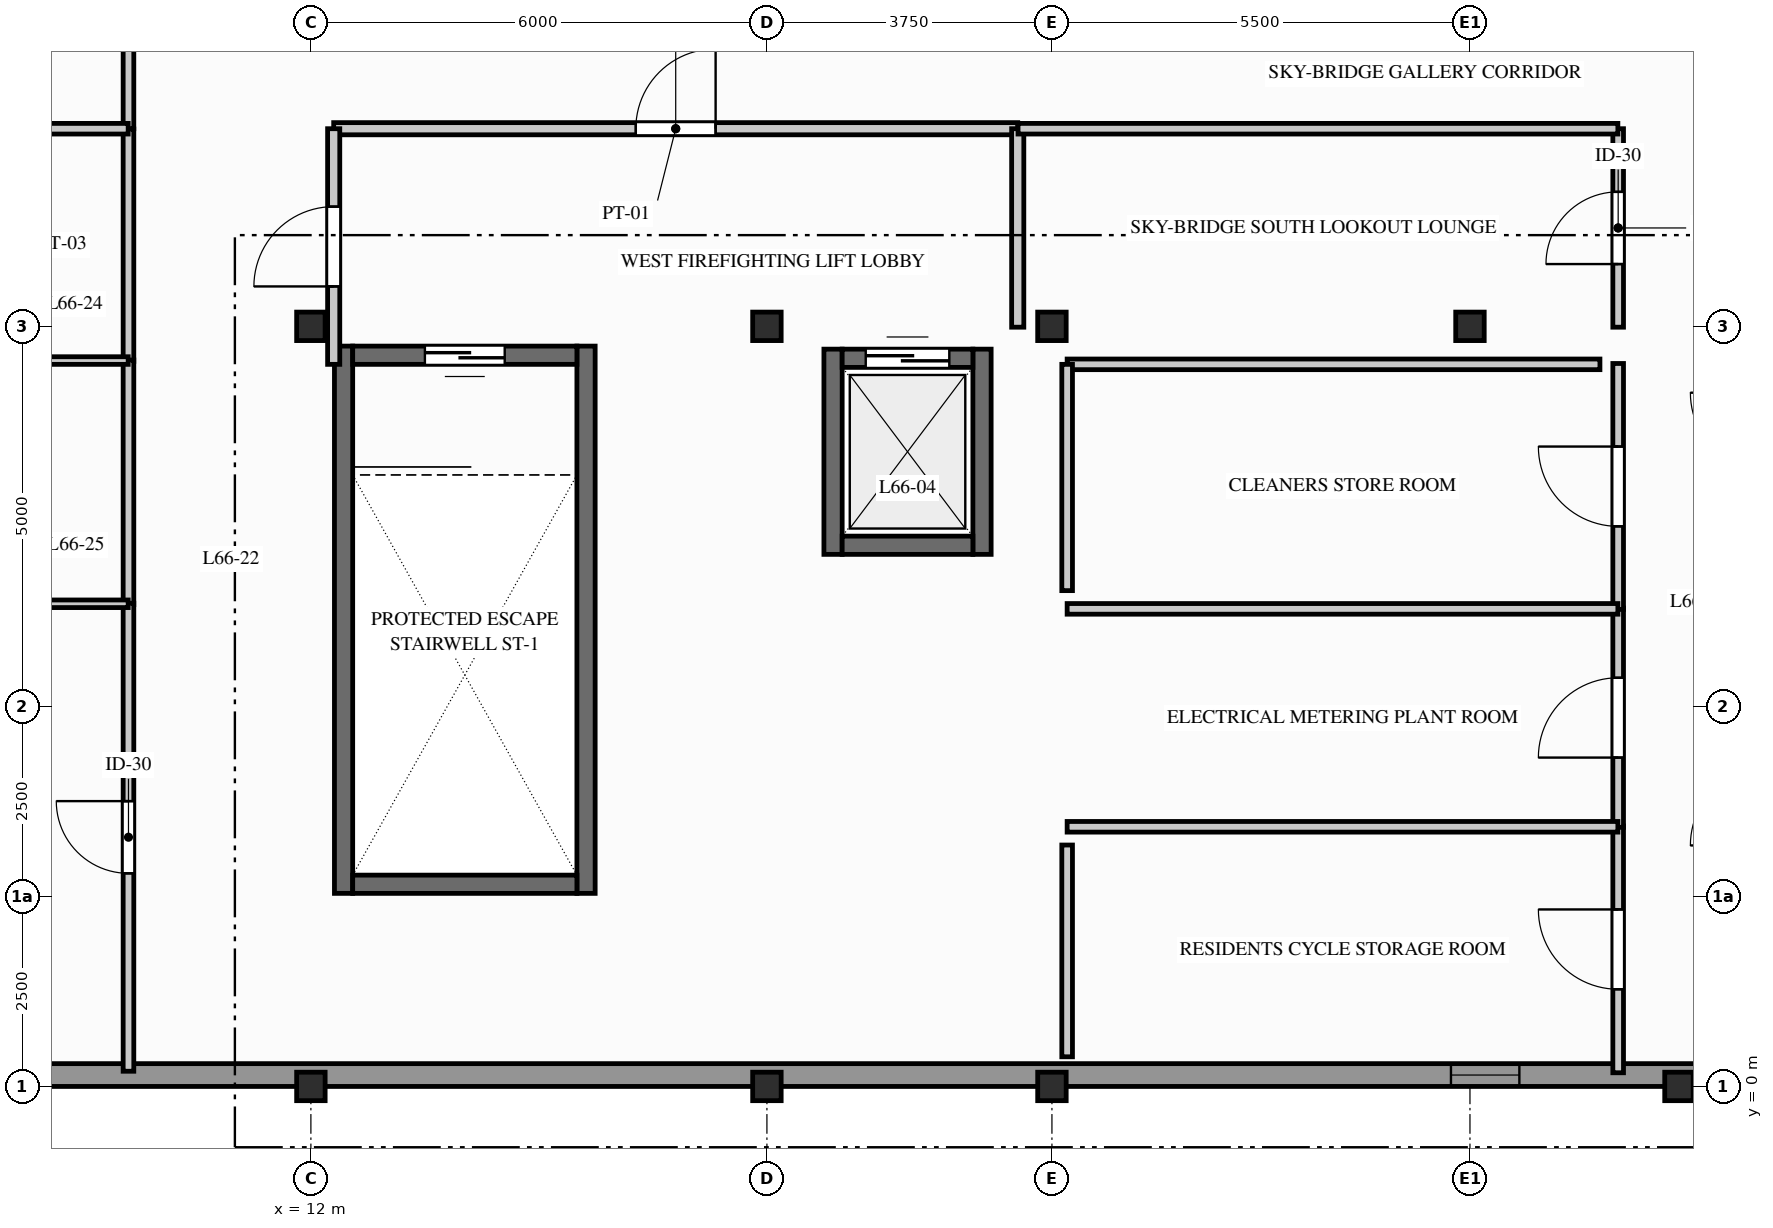
"""IFC4 building model, lengths in metres.
Left out: names, types, materials, properties, quantities, classifications, styles, units other than length and angle.
Written with IfcOpenShell. Run it as: python <this file> out.ifc"""

import sys

from ifc_helpers import new_model, si_unit, direction, frame, frame_2d, origin, origin_2d, place, context, subcontext, project, spatial, rectangle, i_section, extrude, element, fill, save


model = new_model("IFC4")
c1 = context("Model", 3, precision=1e-05, world=origin(), true_north=direction((0.0, 1.0)))
c2 = subcontext(c1, "Body", "Model", "MODEL_VIEW")
j1 = project(units=[si_unit("LENGTHUNIT", "METRE"), si_unit("PLANEANGLEUNIT", "RADIAN")], contexts=[c1])
p1 = place(None, origin())
s1 = spatial("IfcSite", under=j1, at=p1, CompositionType="ELEMENT")
p2 = place(p1, origin())
s2 = spatial("IfcBuilding", under=s1, at=p2, CompositionType="ELEMENT")
p3 = place(p2, frame((0.0, 0.0, 218.0)))
s3 = spatial("IfcBuildingStorey", under=s2, at=p3, CompositionType="ELEMENT", Elevation=218.0)
for number, where, z_axis, x_axis in (
    (1, (12.0, 0.0, 0.0), (0.0, 0.0, 1.0), (1.0, 0.0, 0.0)),
    (2, (12.0, 10.0, 0.0), (0.0, 0.0, 1.0), (1.0, 0.0, 0.0)),
    (3, (18.0, 0.0, 0.0), (0.0, 0.0, 1.0), (1.0, 0.0, 0.0)),
    (4, (18.0, 10.0, 0.0), (0.0, 0.0, 1.0), (1.0, 0.0, 0.0)),
    (5, (21.75, 0.0, 0.0), (0.0, 0.0, 1.0), (1.0, 0.0, 0.0)),
    (6, (21.75, 10.0, 0.0), (0.0, 0.0, 1.0), (1.0, 0.0, 0.0)),
    (7, (27.25, 10.0, 0.0), (0.0, 0.0, 1.0), (1.0, 0.0, 0.0)),
    (8, (30.0, 0.0, 0.0), (0.0, 0.0, 1.0), (1.0, 0.0, 0.0)),
):
    element("IfcColumn", number, at=place(p3, frame(where, z_axis=z_axis, x_axis=x_axis)), inside=s3, PredefinedType="COLUMN", context=c2, shape_type="SweptSolid", body=[
        extrude(i_section(OverallWidth=0.375, OverallDepth=0.375, WebThickness=0.017, FlangeThickness=0.027, FilletRadius=0.015, at=origin_2d()), origin(), (0.0, 0.0, 1.0), 3.1),
    ])
p4 = place(p3, frame((2.5, 0.15, 0.0), z_axis=(0.0, 0.0, 1.0), x_axis=(1.0, 0.0, 0.0)))
e9 = element("IfcWall", 9, at=p4, inside=s3, PredefinedType="STANDARD", context=c2, shape_type="SweptSolid", body=[
    extrude(rectangle(XDim=55.0, YDim=0.3, at=frame_2d((27.5, 0.0))), origin(), (0.0, 0.0, 1.0), 2.332),
])
p5 = place(p4, frame((1.0, 0.0, 0.312)))
e10 = element("IfcOpeningElement", 10, at=p5, cuts=e9, PredefinedType="OPENING", context=c2, shape_type="SweptSolid", body=[
    extrude(rectangle(XDim=1.5, YDim=1.8, at=frame_2d((0.75, 0.9))), frame((0.0, 0.16, 0.0), z_axis=(0.0, -1.0, 0.0), x_axis=(1.0, 0.0, 0.0)), (0.0, 0.0, 1.0), 0.32),
])
p6 = place(p4, frame((24.5, 0.0, 1.15)))
e11 = element("IfcOpeningElement", 11, at=p6, cuts=e9, PredefinedType="OPENING", context=c2, shape_type="SweptSolid", body=[
    extrude(rectangle(XDim=0.9, YDim=0.9, at=frame_2d((0.45, 0.45))), frame((0.0, 0.16, 0.0), z_axis=(0.0, -1.0, 0.0), x_axis=(1.0, 0.0, 0.0)), (0.0, 0.0, 1.0), 0.32),
])
p7 = place(p4, frame((47.2, 0.0, 0.512)))
e12 = element("IfcOpeningElement", 12, at=p7, cuts=e9, PredefinedType="OPENING", context=c2, shape_type="SweptSolid", body=[
    extrude(rectangle(XDim=1.2, YDim=1.6, at=frame_2d((0.6, 0.8))), frame((0.0, 0.16, 0.0), z_axis=(0.0, -1.0, 0.0), x_axis=(1.0, 0.0, 0.0)), (0.0, 0.0, 1.0), 0.32),
])
p8 = place(p4, frame((52.3, 0.0, 0.512)))
e13 = element("IfcOpeningElement", 13, at=p8, cuts=e9, PredefinedType="OPENING", context=c2, shape_type="SweptSolid", body=[
    extrude(rectangle(XDim=1.2, YDim=1.6, at=frame_2d((0.6, 0.8))), frame((0.0, 0.16, 0.0), z_axis=(0.0, -1.0, 0.0), x_axis=(1.0, 0.0, 0.0)), (0.0, 0.0, 1.0), 0.32),
])
for number, where, z_axis, x_axis in (
    (14, (12.43, 2.54, 0.0), (0.0, 0.0, 1.0), (0.0, 1.0, 0.0)),
    (15, (15.62, 2.54, 0.0), (0.0, 0.0, 1.0), (0.0, 1.0, 0.0)),
):
    element("IfcWall", number, at=place(p3, frame(where, z_axis=z_axis, x_axis=x_axis)), inside=s3, PredefinedType="SHEAR", context=c2, shape_type="SweptSolid", body=[
        extrude(rectangle(XDim=7.2, YDim=0.24, at=frame_2d((3.6, 0.0))), origin(), (0.0, 0.0, 1.0), 2.89),
    ])
p9 = place(p3, frame((12.55, 2.66, 0.0), z_axis=(0.0, 0.0, 1.0), x_axis=(1.0, 0.0, 0.0)))
e16 = element("IfcWall", 16, at=p9, inside=s3, PredefinedType="SHEAR", context=c2, shape_type="SweptSolid", body=[
    extrude(rectangle(XDim=2.95, YDim=0.24, at=frame_2d((1.475, 0.0))), origin(), (0.0, 0.0, 1.0), 2.89),
])
p10 = place(p3, frame((15.5, 9.62, 0.0), z_axis=(0.0, 0.0, 1.0), x_axis=(-1.0, 0.0, 0.0)))
e17 = element("IfcWall", 17, at=p10, inside=s3, PredefinedType="SHEAR", context=c2, shape_type="SweptSolid", body=[
    extrude(rectangle(XDim=2.95, YDim=0.24, at=frame_2d((1.475, 0.0))), origin(), (0.0, 0.0, 1.0), 2.89),
])
p11 = place(p10, frame((0.95, 0.0, 0.0)))
e18 = element("IfcOpeningElement", 18, at=p11, cuts=e17, PredefinedType="OPENING", context=c2, shape_type="SweptSolid", body=[
    extrude(rectangle(XDim=1.05, YDim=2.06, at=frame_2d((0.525, 1.03))), frame((0.0, 0.13, 0.0), z_axis=(0.0, -1.0, 0.0), x_axis=(1.0, 0.0, 0.0)), (0.0, 0.0, 1.0), 0.26),
])
for number, where, z_axis, x_axis in (
    (19, (18.87, 7.0, 0.0), (0.0, 0.0, 1.0), (0.0, 1.0, 0.0)),
    (20, (20.83, 7.0, 0.0), (0.0, 0.0, 1.0), (0.0, 1.0, 0.0)),
):
    element("IfcWall", number, at=place(p3, frame(where, z_axis=z_axis, x_axis=x_axis)), inside=s3, PredefinedType="SHEAR", context=c2, shape_type="SweptSolid", body=[
        extrude(rectangle(XDim=2.7, YDim=0.24, at=frame_2d((1.35, 0.0))), origin(), (0.0, 0.0, 1.0), 2.89),
    ])
p12 = place(p3, frame((18.99, 7.12, 0.0), z_axis=(0.0, 0.0, 1.0), x_axis=(1.0, 0.0, 0.0)))
e21 = element("IfcWall", 21, at=p12, inside=s3, PredefinedType="SHEAR", context=c2, shape_type="SweptSolid", body=[
    extrude(rectangle(XDim=1.72, YDim=0.24, at=frame_2d((0.86, 0.0))), origin(), (0.0, 0.0, 1.0), 2.89),
])
p13 = place(p3, frame((18.99, 9.58, 0.0), z_axis=(0.0, 0.0, 1.0), x_axis=(1.0, 0.0, 0.0)))
e22 = element("IfcWall", 22, at=p13, inside=s3, PredefinedType="SHEAR", context=c2, shape_type="SweptSolid", body=[
    extrude(rectangle(XDim=1.72, YDim=0.24, at=frame_2d((0.86, 0.0))), origin(), (0.0, 0.0, 1.0), 2.89),
])
p14 = place(p13, frame((0.31, 0.0, 0.0)))
e23 = element("IfcOpeningElement", 23, at=p14, cuts=e22, PredefinedType="OPENING", context=c2, shape_type="SweptSolid", body=[
    extrude(rectangle(XDim=1.1, YDim=2.06, at=frame_2d((0.55, 1.03))), frame((0.0, 0.13, 0.0), z_axis=(0.0, -1.0, 0.0), x_axis=(1.0, 0.0, 0.0)), (0.0, 0.0, 1.0), 0.26),
])
p15 = place(p3, frame((29.2, 0.18, 0.0), z_axis=(0.0, 0.0, 1.0), x_axis=(0.0, 1.0, 0.0)))
e24 = element("IfcWall", 24, at=p15, inside=s3, PredefinedType="PARTITIONING", context=c2, shape_type="SweptSolid", body=[
    extrude(rectangle(XDim=3.247, YDim=0.14, at=frame_2d((1.624, 0.0))), origin(), (0.0, 0.0, 1.0), 2.89),
])
p16 = place(p15, frame((1.099, 0.0, 0.0)))
e25 = element("IfcOpeningElement", 25, at=p16, cuts=e24, PredefinedType="OPENING", context=c2, shape_type="SweptSolid", body=[
    extrude(rectangle(XDim=1.05, YDim=2.06, at=frame_2d((0.525, 1.03))), frame((0.0, 0.08, 0.0), z_axis=(0.0, -1.0, 0.0), x_axis=(1.0, 0.0, 0.0)), (0.0, 0.0, 1.0), 0.16),
])
p17 = place(p3, frame((29.2, 3.409, 0.0), z_axis=(0.0, 0.0, 1.0), x_axis=(0.0, 1.0, 0.0)))
e26 = element("IfcWall", 26, at=p17, inside=s3, PredefinedType="PARTITIONING", context=c2, shape_type="SweptSolid", body=[
    extrude(rectangle(XDim=2.885, YDim=0.14, at=frame_2d((1.443, 0.0))), origin(), (0.0, 0.0, 1.0), 2.89),
])
p18 = place(p17, frame((0.918, 0.0, 0.0)))
e27 = element("IfcOpeningElement", 27, at=p18, cuts=e26, PredefinedType="OPENING", context=c2, shape_type="SweptSolid", body=[
    extrude(rectangle(XDim=1.05, YDim=2.06, at=frame_2d((0.525, 1.03))), frame((0.0, 0.08, 0.0), z_axis=(0.0, -1.0, 0.0), x_axis=(1.0, 0.0, 0.0)), (0.0, 0.0, 1.0), 0.16),
])
p19 = place(p3, frame((29.2, 6.276, 0.0), z_axis=(0.0, 0.0, 1.0), x_axis=(0.0, 1.0, 0.0)))
e28 = element("IfcWall", 28, at=p19, inside=s3, PredefinedType="PARTITIONING", context=c2, shape_type="SweptSolid", body=[
    extrude(rectangle(XDim=3.236, YDim=0.14, at=frame_2d((1.618, 0.0))), origin(), (0.0, 0.0, 1.0), 2.89),
])
p20 = place(p19, frame((1.093, 0.0, 0.0)))
e29 = element("IfcOpeningElement", 29, at=p20, cuts=e28, PredefinedType="OPENING", context=c2, shape_type="SweptSolid", body=[
    extrude(rectangle(XDim=1.05, YDim=2.06, at=frame_2d((0.525, 1.03))), frame((0.0, 0.08, 0.0), z_axis=(0.0, -1.0, 0.0), x_axis=(1.0, 0.0, 0.0)), (0.0, 0.0, 1.0), 0.16),
])
p21 = place(p3, frame((29.2, 9.989, 0.0), z_axis=(0.0, 0.0, 1.0), x_axis=(0.0, 1.0, 0.0)))
e30 = element("IfcWall", 30, at=p21, inside=s3, PredefinedType="PARTITIONING", context=c2, shape_type="SweptSolid", body=[
    extrude(rectangle(XDim=2.611, YDim=0.14, at=frame_2d((1.306, 0.0))), origin(), (0.0, 0.0, 1.0), 2.325),
])
p22 = place(p21, frame((0.831, 0.0, 0.0)))
e31 = element("IfcOpeningElement", 31, at=p22, cuts=e30, PredefinedType="OPENING", context=c2, shape_type="SweptSolid", body=[
    extrude(rectangle(XDim=0.95, YDim=2.05, at=frame_2d((0.475, 1.025))), frame((0.0, 0.08, 0.0), z_axis=(0.0, -1.0, 0.0), x_axis=(1.0, 0.0, 0.0)), (0.0, 0.0, 1.0), 0.16),
])
for number, where, z_axis, x_axis in (
    (32, (21.95, 3.416, 0.0), (0.0, 0.0, 1.0), (1.0, 0.0, 0.0)),
    (33, (21.95, 6.283, 0.0), (0.0, 0.0, 1.0), (1.0, 0.0, 0.0)),
):
    element("IfcWall", number, at=place(p3, frame(where, z_axis=z_axis, x_axis=x_axis)), inside=s3, PredefinedType="PARTITIONING", context=c2, shape_type="SweptSolid", body=[
        extrude(rectangle(XDim=7.246, YDim=0.14, at=frame_2d((3.623, 0.0))), origin(), (0.0, 0.0, 1.0), 2.89),
    ])
p23 = place(p3, frame((12.3, 12.6, 0.0), z_axis=(0.0, 0.0, 1.0), x_axis=(1.0, 0.0, 0.0)))
e34 = element("IfcWall", 34, at=p23, inside=s3, PredefinedType="PARTITIONING", context=c2, shape_type="SweptSolid", body=[
    extrude(rectangle(XDim=9.0, YDim=0.16, at=frame_2d((4.5, 0.0))), origin(), (0.0, 0.0, 1.0), 2.325),
])
p24 = place(p23, frame((3.975, 0.0, 0.0)))
e35 = element("IfcOpeningElement", 35, at=p24, cuts=e34, PredefinedType="OPENING", context=c2, shape_type="SweptSolid", body=[
    extrude(rectangle(XDim=1.05, YDim=2.06, at=frame_2d((0.525, 1.03))), frame((0.0, 0.09, 0.0), z_axis=(0.0, -1.0, 0.0), x_axis=(1.0, 0.0, 0.0)), (0.0, 0.0, 1.0), 0.18),
])
p25 = place(p3, frame((12.3, 9.5, 0.0), z_axis=(0.0, 0.0, 1.0), x_axis=(0.0, 1.0, 0.0)))
e36 = element("IfcWall", 36, at=p25, inside=s3, PredefinedType="PARTITIONING", context=c2, shape_type="SweptSolid", body=[
    extrude(rectangle(XDim=3.1, YDim=0.16, at=frame_2d((1.55, 0.0))), origin(), (0.0, 0.0, 1.0), 2.325),
])
p26 = place(p25, frame((1.025, 0.0, 0.0)))
e37 = element("IfcOpeningElement", 37, at=p26, cuts=e36, PredefinedType="OPENING", context=c2, shape_type="SweptSolid", body=[
    extrude(rectangle(XDim=1.05, YDim=2.06, at=frame_2d((0.525, 1.03))), frame((0.0, 0.09, 0.0), z_axis=(0.0, -1.0, 0.0), x_axis=(1.0, 0.0, 0.0)), (0.0, 0.0, 1.0), 0.18),
])
p27 = place(p3, frame((21.3, 9.989, 0.0), z_axis=(0.0, 0.0, 1.0), x_axis=(0.0, 1.0, 0.0)))
e38 = element("IfcWall", 38, at=p27, inside=s3, PredefinedType="PARTITIONING", context=c2, shape_type="SweptSolid", body=[
    extrude(rectangle(XDim=2.611, YDim=0.16, at=frame_2d((1.306, 0.0))), origin(), (0.0, 0.0, 1.0), 2.325),
])
p28 = place(p3, frame((9.6, 12.6, 0.0), z_axis=(0.0, 0.0, 1.0), x_axis=(0.0, 1.0, 0.0)))
e39 = element("IfcWall", 39, at=p28, inside=s3, PredefinedType="PARTITIONING", context=c2, shape_type="SweptSolid", body=[
    extrude(rectangle(XDim=1.45, YDim=0.14, at=frame_2d((0.725, 0.0))), origin(), (0.0, 0.0, 1.0), 2.89),
])
p29 = place(p3, frame((21.304, 12.6, 0.0), z_axis=(0.0, 0.0, 1.0), x_axis=(1.0, 0.0, 0.0)))
e40 = element("IfcWall", 40, at=p29, inside=s3, PredefinedType="PARTITIONING", context=c2, shape_type="SweptSolid", body=[
    extrude(rectangle(XDim=7.892, YDim=0.14, at=frame_2d((3.946, 0.0))), origin(), (0.0, 0.0, 1.0), 2.325),
])
p30 = place(p3, frame((9.6, 9.539, 0.0), z_axis=(0.0, 0.0, 1.0), x_axis=(0.0, 1.0, 0.0)))
e41 = element("IfcWall", 41, at=p30, inside=s3, PredefinedType="PARTITIONING", context=c2, shape_type="SweptSolid", body=[
    extrude(rectangle(XDim=3.057, YDim=0.14, at=frame_2d((1.529, 0.0))), origin(), (0.0, 0.0, 1.0), 2.325),
])
p31 = place(p3, frame((9.6, 6.339, 0.0), z_axis=(0.0, 0.0, 1.0), x_axis=(0.0, 1.0, 0.0)))
e42 = element("IfcWall", 42, at=p31, inside=s3, PredefinedType="PARTITIONING", context=c2, shape_type="SweptSolid", body=[
    extrude(rectangle(XDim=3.219, YDim=0.14, at=frame_2d((1.609, 0.0))), origin(), (0.0, 0.0, 1.0), 2.89),
])
p32 = place(p3, frame((9.6, 0.2, 0.0), z_axis=(0.0, 0.0, 1.0), x_axis=(0.0, 1.0, 0.0)))
e43 = element("IfcWall", 43, at=p32, inside=s3, PredefinedType="PARTITIONING", context=c2, shape_type="SweptSolid", body=[
    extrude(rectangle(XDim=6.157, YDim=0.14, at=frame_2d((3.079, 0.0))), origin(), (0.0, 0.0, 1.0), 2.89),
])
p33 = place(p32, frame((2.604, 0.0, 0.0)))
e44 = element("IfcOpeningElement", 44, at=p33, cuts=e43, PredefinedType="OPENING", context=c2, shape_type="SweptSolid", body=[
    extrude(rectangle(XDim=0.95, YDim=2.05, at=frame_2d((0.475, 1.025))), frame((0.0, 0.08, 0.0), z_axis=(0.0, -1.0, 0.0), x_axis=(1.0, 0.0, 0.0)), (0.0, 0.0, 1.0), 0.16),
])
p34 = place(p3, frame((7.438, 9.55, 0.0), z_axis=(0.0, 0.0, 1.0), x_axis=(1.0, 0.0, 0.0)))
e45 = element("IfcWall", 45, at=p34, inside=s3, PredefinedType="PARTITIONING", context=c2, shape_type="SweptSolid", body=[
    extrude(rectangle(XDim=2.158, YDim=0.1, at=frame_2d((1.079, 0.0))), origin(), (0.0, 0.0, 1.0), 2.89),
])
p35 = place(p3, frame((7.438, 12.6, 0.0), z_axis=(0.0, 0.0, 1.0), x_axis=(1.0, 0.0, 0.0)))
e46 = element("IfcWall", 46, at=p35, inside=s3, PredefinedType="PARTITIONING", context=c2, shape_type="SweptSolid", body=[
    extrude(rectangle(XDim=2.158, YDim=0.14, at=frame_2d((1.079, 0.0))), origin(), (0.0, 0.0, 1.0), 2.89),
])
p36 = place(p3, frame((7.438, 6.35, 0.0), z_axis=(0.0, 0.0, 1.0), x_axis=(1.0, 0.0, 0.0)))
e47 = element("IfcWall", 47, at=p36, inside=s3, PredefinedType="PARTITIONING", context=c2, shape_type="SweptSolid", body=[
    extrude(rectangle(XDim=2.158, YDim=0.1, at=frame_2d((1.079, 0.0))), origin(), (0.0, 0.0, 1.0), 2.89),
])
p37 = place(p3, frame((21.95, 0.39, 0.0), z_axis=(0.0, 0.0, 1.0), x_axis=(0.0, 1.0, 0.0)))
e48 = element("IfcWall", 48, at=p37, inside=s3, PredefinedType="PARTITIONING", context=c2, shape_type="SweptSolid", body=[
    extrude(rectangle(XDim=2.786, YDim=0.14, at=frame_2d((1.393, 0.0))), origin(), (0.0, 0.0, 1.0), 2.325),
])
p38 = place(p3, frame((21.95, 9.5, 0.0), z_axis=(0.0, 0.0, 1.0), x_axis=(1.0, 0.0, 0.0)))
e49 = element("IfcWall", 49, at=p38, inside=s3, PredefinedType="PARTITIONING", context=c2, shape_type="SweptSolid", body=[
    extrude(rectangle(XDim=7.01, YDim=0.14, at=frame_2d((3.505, 0.0))), origin(), (0.0, 0.0, 1.0), 2.89),
])
p39 = place(p3, frame((21.95, 6.523, 0.0), z_axis=(0.0, 0.0, 1.0), x_axis=(0.0, 1.0, 0.0)))
e50 = element("IfcWall", 50, at=p39, inside=s3, PredefinedType="PARTITIONING", context=c2, shape_type="SweptSolid", body=[
    extrude(rectangle(XDim=2.977, YDim=0.14, at=frame_2d((1.489, 0.0))), origin(), (0.0, 0.0, 1.0), 2.325),
])
p40 = place(p6, origin())
e51 = element("IfcWindow", 51, at=p40, inside=s3, PartitioningType="SINGLE_PANEL", PredefinedType="WINDOW", context=c2, shape_type="SweptSolid", body=[
    extrude(rectangle(XDim=0.9, YDim=0.9, at=frame_2d((0.45, 0.45))), frame((0.0, 0.03, 0.0), z_axis=(0.0, -1.0, 0.0), x_axis=(1.0, 0.0, 0.0)), (0.0, 0.0, 1.0), 0.06),
])
fill(e11, e51)
p41 = place(p11, origin())
e52 = element("IfcDoor", 52, at=p41, inside=s3, OperationType="SINGLE_SWING_RIGHT", PredefinedType="DOOR", context=c2, shape_type="SweptSolid", body=[
    extrude(rectangle(XDim=1.05, YDim=2.06, at=frame_2d((0.525, 1.03))), frame((0.0, 0.025, 0.0), z_axis=(0.0, -1.0, 0.0), x_axis=(1.0, 0.0, 0.0)), (0.0, 0.0, 1.0), 0.05),
])
fill(e18, e52)
p42 = place(p14, origin())
e53 = element("IfcDoor", 53, at=p42, inside=s3, OperationType="SLIDING_TO_RIGHT", PredefinedType="DOOR", context=c2, shape_type="SweptSolid", body=[
    extrude(rectangle(XDim=1.1, YDim=2.06, at=frame_2d((0.55, 1.03))), frame((0.0, 0.025, 0.0), z_axis=(0.0, -1.0, 0.0), x_axis=(1.0, 0.0, 0.0)), (0.0, 0.0, 1.0), 0.05),
])
fill(e23, e53)
p43 = place(p16, origin())
e54 = element("IfcDoor", 54, at=p43, inside=s3, OperationType="SINGLE_SWING_RIGHT", PredefinedType="DOOR", context=c2, shape_type="SweptSolid", body=[
    extrude(rectangle(XDim=1.05, YDim=2.06, at=frame_2d((0.525, 1.03))), frame((0.0, 0.025, 0.0), z_axis=(0.0, -1.0, 0.0), x_axis=(1.0, 0.0, 0.0)), (0.0, 0.0, 1.0), 0.05),
])
fill(e25, e54)
p44 = place(p18, origin())
e55 = element("IfcDoor", 55, at=p44, inside=s3, OperationType="SINGLE_SWING_LEFT", PredefinedType="DOOR", context=c2, shape_type="SweptSolid", body=[
    extrude(rectangle(XDim=1.05, YDim=2.06, at=frame_2d((0.525, 1.03))), frame((0.0, 0.025, 0.0), z_axis=(0.0, -1.0, 0.0), x_axis=(1.0, 0.0, 0.0)), (0.0, 0.0, 1.0), 0.05),
])
fill(e27, e55)
p45 = place(p20, origin())
e56 = element("IfcDoor", 56, at=p45, inside=s3, OperationType="SINGLE_SWING_RIGHT", PredefinedType="DOOR", context=c2, shape_type="SweptSolid", body=[
    extrude(rectangle(XDim=1.05, YDim=2.06, at=frame_2d((0.525, 1.03))), frame((0.0, 0.025, 0.0), z_axis=(0.0, -1.0, 0.0), x_axis=(1.0, 0.0, 0.0)), (0.0, 0.0, 1.0), 0.05),
])
fill(e29, e56)
p46 = place(p22, origin())
e57 = element("IfcDoor", 57, at=p46, inside=s3, OperationType="SINGLE_SWING_LEFT", PredefinedType="DOOR", context=c2, shape_type="SweptSolid", body=[
    extrude(rectangle(XDim=0.95, YDim=2.05, at=frame_2d((0.475, 1.025))), frame((0.0, 0.025, 0.0), z_axis=(0.0, -1.0, 0.0), x_axis=(1.0, 0.0, 0.0)), (0.0, 0.0, 1.0), 0.05),
])
fill(e31, e57)
p47 = place(p24, origin())
e58 = element("IfcDoor", 58, at=p47, inside=s3, OperationType="SINGLE_SWING_RIGHT", PredefinedType="DOOR", context=c2, shape_type="SweptSolid", body=[
    extrude(rectangle(XDim=1.05, YDim=2.06, at=frame_2d((0.525, 1.03))), frame((0.0, 0.025, 0.0), z_axis=(0.0, -1.0, 0.0), x_axis=(1.0, 0.0, 0.0)), (0.0, 0.0, 1.0), 0.05),
])
fill(e35, e58)
p48 = place(p26, origin())
e59 = element("IfcDoor", 59, at=p48, inside=s3, OperationType="SINGLE_SWING_LEFT", PredefinedType="DOOR", context=c2, shape_type="SweptSolid", body=[
    extrude(rectangle(XDim=1.05, YDim=2.06, at=frame_2d((0.525, 1.03))), frame((0.0, 0.025, 0.0), z_axis=(0.0, -1.0, 0.0), x_axis=(1.0, 0.0, 0.0)), (0.0, 0.0, 1.0), 0.05),
])
fill(e37, e59)
p49 = place(p33, origin())
e60 = element("IfcDoor", 60, at=p49, inside=s3, OperationType="SINGLE_SWING_RIGHT", PredefinedType="DOOR", context=c2, shape_type="SweptSolid", body=[
    extrude(rectangle(XDim=0.95, YDim=2.05, at=frame_2d((0.475, 1.025))), frame((0.0, 0.025, 0.0), z_axis=(0.0, -1.0, 0.0), x_axis=(1.0, 0.0, 0.0)), (0.0, 0.0, 1.0), 0.05),
])
fill(e44, e60)
save(model, sys.argv[1])
